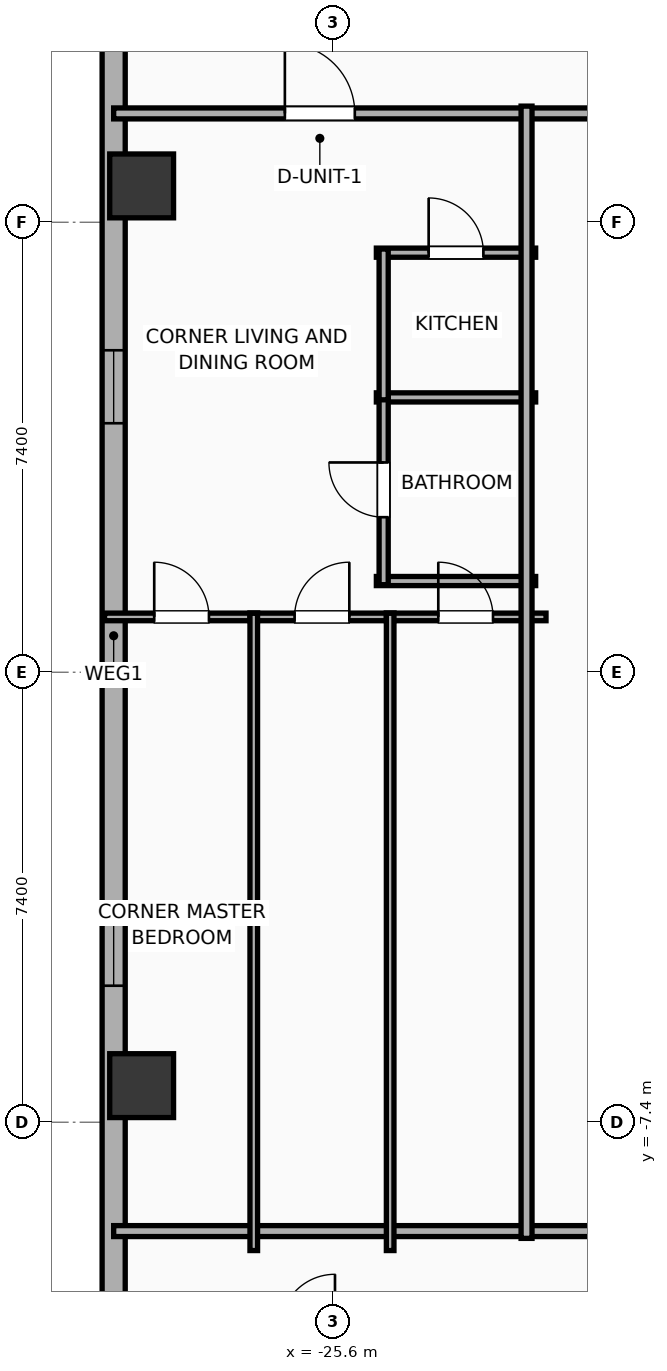
"""IFC4 building model, lengths in metres.
Left out: names, types, materials, properties, quantities, classifications, styles, units other than length and angle.
Written with IfcOpenShell. Run it as: python <this file> out.ifc"""

import sys

from ifc_helpers import new_model, si_unit, direction, frame, frame_2d, origin, origin_2d, place, context, subcontext, project, spatial, rectangle, hollow_rectangle, extrude, element, fill, save


model = new_model("IFC4")
c1 = context("Model", 3, precision=1e-05, world=origin(), true_north=direction((0.0, 1.0)))
c2 = subcontext(c1, "Body", "Model", "MODEL_VIEW")
j1 = project(units=[si_unit("LENGTHUNIT", "METRE"), si_unit("PLANEANGLEUNIT", "RADIAN")], contexts=[c1])
p1 = place(None, origin())
s1 = spatial("IfcSite", under=j1, at=p1, CompositionType="ELEMENT")
p2 = place(p1, origin())
s2 = spatial("IfcBuilding", under=s1, at=p2, CompositionType="ELEMENT")
p3 = place(p2, frame((0.0, 0.0, 132.6)))
s3 = spatial("IfcBuildingStorey", under=s2, at=p3, CompositionType="ELEMENT", Elevation=132.6)
for number, where, z_axis, x_axis in (
    (1, (-28.75, 7.998, 0.0), (0.0, 0.0, 1.0), (1.0, 0.0, 0.0)),
    (2, (-28.75, -6.798, 0.0), (0.0, 0.0, 1.0), (1.0, 0.0, 0.0)),
):
    element("IfcColumn", number, at=place(p3, frame(where, z_axis=z_axis, x_axis=x_axis)), inside=s3, PredefinedType="COLUMN", context=c2, shape_type="SweptSolid", body=[
        extrude(hollow_rectangle(XDim=1.05, YDim=1.05, WallThickness=0.036, at=origin_2d()), origin(), (0.0, 0.0, 1.0), 3.9),
    ])
p4 = place(p3, frame((-29.21, -16.581, 0.0), z_axis=(0.0, 0.0, 1.0), x_axis=(0.0, 1.0, 0.0)))
e3 = element("IfcWall", 3, at=p4, inside=s3, PredefinedType="ELEMENTEDWALL", context=c2, shape_type="SweptSolid", body=[
    extrude(rectangle(XDim=34.363, YDim=0.38, at=frame_2d((17.181, 0.0))), origin(), (0.0, 0.0, 1.0), 3.65),
])
p5 = place(p4, frame((31.437, 0.0, 0.75)))
e4 = element("IfcOpeningElement", 4, at=p5, cuts=e3, PredefinedType="OPENING", context=c2, shape_type="SweptSolid", body=[
    extrude(rectangle(XDim=1.2, YDim=2.05, at=frame_2d((0.6, 1.025))), frame((0.0, 0.2, 0.0), z_axis=(0.0, -1.0, 0.0), x_axis=(1.0, 0.0, 0.0)), (0.0, 0.0, 1.0), 0.4),
])
p6 = place(p4, frame((20.676, 0.0, 0.75)))
e5 = element("IfcOpeningElement", 5, at=p6, cuts=e3, PredefinedType="OPENING", context=c2, shape_type="SweptSolid", body=[
    extrude(rectangle(XDim=1.2, YDim=2.05, at=frame_2d((0.6, 1.025))), frame((0.0, 0.2, 0.0), z_axis=(0.0, -1.0, 0.0), x_axis=(1.0, 0.0, 0.0)), (0.0, 0.0, 1.0), 0.4),
])
p7 = place(p4, frame((11.426, 0.0, 0.75)))
e6 = element("IfcOpeningElement", 6, at=p7, cuts=e3, PredefinedType="OPENING", context=c2, shape_type="SweptSolid", body=[
    extrude(rectangle(XDim=1.2, YDim=2.05, at=frame_2d((0.6, 1.025))), frame((0.0, 0.2, 0.0), z_axis=(0.0, -1.0, 0.0), x_axis=(1.0, 0.0, 0.0)), (0.0, 0.0, 1.0), 0.4),
])
p8 = place(p3, frame((-29.21, 9.19, 0.0), z_axis=(0.0, 0.0, 1.0), x_axis=(1.0, 0.0, 0.0)))
e7 = element("IfcWall", 7, at=p8, inside=s3, PredefinedType="PARTITIONING", context=c2, shape_type="SweptSolid", body=[
    extrude(rectangle(XDim=19.33, YDim=0.18, at=frame_2d((9.665, 0.0))), origin(), (0.0, 0.0, 1.0), 3.65),
])
p9 = place(p8, frame((2.815, 0.0, 0.0)))
e8 = element("IfcOpeningElement", 8, at=p9, cuts=e7, PredefinedType="OPENING", context=c2, shape_type="SweptSolid", body=[
    extrude(rectangle(XDim=1.15, YDim=2.05, at=frame_2d((0.575, 1.025))), frame((0.0, 0.1, 0.0), z_axis=(0.0, -1.0, 0.0), x_axis=(1.0, 0.0, 0.0)), (0.0, 0.0, 1.0), 0.2),
])
p10 = place(p3, frame((-29.21, -9.19, 0.0), z_axis=(0.0, 0.0, 1.0), x_axis=(1.0, 0.0, 0.0)))
e9 = element("IfcWall", 9, at=p10, inside=s3, PredefinedType="PARTITIONING", context=c2, shape_type="SweptSolid", body=[
    extrude(rectangle(XDim=19.33, YDim=0.18, at=frame_2d((9.665, 0.0))), origin(), (0.0, 0.0, 1.0), 3.65),
])
p11 = place(p3, frame((-24.89, 6.9, 0.0), z_axis=(0.0, 0.0, 1.0), x_axis=(1.0, 0.0, 0.0)))
e10 = element("IfcWall", 10, at=p11, inside=s3, PredefinedType="PLUMBINGWALL", context=c2, shape_type="SweptSolid", body=[
    extrude(rectangle(XDim=2.62, YDim=0.15, at=frame_2d((1.31, 0.0))), origin(), (0.0, 0.0, 1.0), 3.65),
])
p12 = place(p11, frame((0.86, 0.0, 0.0)))
e11 = element("IfcOpeningElement", 11, at=p12, cuts=e10, PredefinedType="OPENING", context=c2, shape_type="SweptSolid", body=[
    extrude(rectangle(XDim=0.9, YDim=2.05, at=frame_2d((0.45, 1.025))), frame((0.0, 0.085, 0.0), z_axis=(0.0, -1.0, 0.0), x_axis=(1.0, 0.0, 0.0)), (0.0, 0.0, 1.0), 0.17),
])
for number, where, z_axis, x_axis in (
    (12, (-24.89, 4.52, 0.0), (0.0, 0.0, 1.0), (1.0, 0.0, 0.0)),
    (13, (-24.89, 1.5, 0.0), (0.0, 0.0, 1.0), (1.0, 0.0, 0.0)),
):
    element("IfcWall", number, at=place(p3, frame(where, z_axis=z_axis, x_axis=x_axis)), inside=s3, PredefinedType="PLUMBINGWALL", context=c2, shape_type="SweptSolid", body=[
        extrude(rectangle(XDim=2.62, YDim=0.15, at=frame_2d((1.31, 0.0))), origin(), (0.0, 0.0, 1.0), 3.65),
    ])
p13 = place(p3, frame((-24.77, 1.44, 0.0), z_axis=(0.0, 0.0, 1.0), x_axis=(0.0, 1.0, 0.0)))
e14 = element("IfcWall", 14, at=p13, inside=s3, PredefinedType="PLUMBINGWALL", context=c2, shape_type="SweptSolid", body=[
    extrude(rectangle(XDim=3.12, YDim=0.15, at=frame_2d((1.56, 0.0))), origin(), (0.0, 0.0, 1.0), 3.65),
])
p14 = place(p13, frame((1.11, 0.0, 0.0)))
e15 = element("IfcOpeningElement", 15, at=p14, cuts=e14, PredefinedType="OPENING", context=c2, shape_type="SweptSolid", body=[
    extrude(rectangle(XDim=0.9, YDim=2.05, at=frame_2d((0.45, 1.025))), frame((0.0, 0.085, 0.0), z_axis=(0.0, -1.0, 0.0), x_axis=(1.0, 0.0, 0.0)), (0.0, 0.0, 1.0), 0.17),
])
p15 = place(p3, frame((-24.77, 4.48, 0.0), z_axis=(0.0, 0.0, 1.0), x_axis=(0.0, 1.0, 0.0)))
e16 = element("IfcWall", 16, at=p15, inside=s3, PredefinedType="PLUMBINGWALL", context=c2, shape_type="SweptSolid", body=[
    extrude(rectangle(XDim=2.48, YDim=0.15, at=frame_2d((1.24, 0.0))), origin(), (0.0, 0.0, 1.0), 3.65),
])
p16 = place(p3, frame((-29.36, 0.91, 0.0), z_axis=(0.0, 0.0, 1.0), x_axis=(1.0, 0.0, 0.0)))
e17 = element("IfcWall", 17, at=p16, inside=s3, PredefinedType="PARTITIONING", context=c2, shape_type="SweptSolid", body=[
    extrude(rectangle(XDim=2.517, YDim=0.125, at=frame_2d((1.258, 0.0))), origin(), (0.0, 0.0, 1.0), 3.65),
])
p17 = place(p16, frame((0.817, 0.0, 0.0)))
e18 = element("IfcOpeningElement", 18, at=p17, cuts=e17, PredefinedType="OPENING", context=c2, shape_type="SweptSolid", body=[
    extrude(rectangle(XDim=0.9, YDim=2.05, at=frame_2d((0.45, 1.025))), frame((0.0, 0.073, 0.0), z_axis=(0.0, -1.0, 0.0), x_axis=(1.0, 0.0, 0.0)), (0.0, 0.0, 1.0), 0.145),
])
p18 = place(p3, frame((-26.969, 0.91, 0.0), z_axis=(0.0, 0.0, 1.0), x_axis=(1.0, 0.0, 0.0)))
e19 = element("IfcWall", 19, at=p18, inside=s3, PredefinedType="PARTITIONING", context=c2, shape_type="SweptSolid", body=[
    extrude(rectangle(XDim=2.368, YDim=0.125, at=frame_2d((1.184, 0.0))), origin(), (0.0, 0.0, 1.0), 3.65),
])
p19 = place(p18, frame((0.734, 0.0, 0.0)))
e20 = element("IfcOpeningElement", 20, at=p19, cuts=e19, PredefinedType="OPENING", context=c2, shape_type="SweptSolid", body=[
    extrude(rectangle(XDim=0.9, YDim=2.05, at=frame_2d((0.45, 1.025))), frame((0.0, 0.073, 0.0), z_axis=(0.0, -1.0, 0.0), x_axis=(1.0, 0.0, 0.0)), (0.0, 0.0, 1.0), 0.145),
])
p20 = place(p3, frame((-24.726, 0.91, 0.0), z_axis=(0.0, 0.0, 1.0), x_axis=(1.0, 0.0, 0.0)))
e21 = element("IfcWall", 21, at=p20, inside=s3, PredefinedType="PARTITIONING", context=c2, shape_type="SweptSolid", body=[
    extrude(rectangle(XDim=2.625, YDim=0.125, at=frame_2d((1.313, 0.0))), origin(), (0.0, 0.0, 1.0), 3.65),
])
p21 = place(p20, frame((0.854, 0.0, 0.0)))
e22 = element("IfcOpeningElement", 22, at=p21, cuts=e21, PredefinedType="OPENING", context=c2, shape_type="SweptSolid", body=[
    extrude(rectangle(XDim=0.9, YDim=2.05, at=frame_2d((0.45, 1.025))), frame((0.0, 0.073, 0.0), z_axis=(0.0, -1.0, 0.0), x_axis=(1.0, 0.0, 0.0)), (0.0, 0.0, 1.0), 0.145),
])
for number, where, z_axis, x_axis in (
    (23, (-24.663, -9.51, 0.0), (0.0, 0.0, 1.0), (0.0, 1.0, 0.0)),
    (24, (-26.906, -9.51, 0.0), (0.0, 0.0, 1.0), (0.0, 1.0, 0.0)),
):
    element("IfcWall", number, at=place(p3, frame(where, z_axis=z_axis, x_axis=x_axis)), inside=s3, PredefinedType="PARTITIONING", context=c2, shape_type="SweptSolid", body=[
        extrude(rectangle(XDim=10.48, YDim=0.125, at=frame_2d((5.24, 0.0))), origin(), (0.0, 0.0, 1.0), 3.65),
    ])
p22 = place(p3, frame((-22.42, -9.31, 0.0), z_axis=(0.0, 0.0, 1.0), x_axis=(0.0, 1.0, 0.0)))
e25 = element("IfcWall", 25, at=p22, inside=s3, PredefinedType="PARTITIONING", context=c2, shape_type="SweptSolid", body=[
    extrude(rectangle(XDim=18.62, YDim=0.18, at=frame_2d((9.31, 0.0))), origin(), (0.0, 0.0, 1.0), 3.65),
])
p23 = place(p6, origin())
e26 = element("IfcWindow", 26, at=p23, inside=s3, PartitioningType="SINGLE_PANEL", PredefinedType="WINDOW", context=c2, shape_type="SweptSolid", body=[
    extrude(rectangle(XDim=1.2, YDim=2.05, at=frame_2d((0.6, 1.025))), frame((0.0, 0.03, 0.0), z_axis=(0.0, -1.0, 0.0), x_axis=(1.0, 0.0, 0.0)), (0.0, 0.0, 1.0), 0.06),
])
fill(e5, e26)
p24 = place(p7, origin())
e27 = element("IfcWindow", 27, at=p24, inside=s3, PartitioningType="SINGLE_PANEL", PredefinedType="WINDOW", context=c2, shape_type="SweptSolid", body=[
    extrude(rectangle(XDim=1.2, YDim=2.05, at=frame_2d((0.6, 1.025))), frame((0.0, 0.03, 0.0), z_axis=(0.0, -1.0, 0.0), x_axis=(1.0, 0.0, 0.0)), (0.0, 0.0, 1.0), 0.06),
])
fill(e6, e27)
p25 = place(p9, origin())
e28 = element("IfcDoor", 28, at=p25, inside=s3, OperationType="SINGLE_SWING_LEFT", PredefinedType="DOOR", context=c2, shape_type="SweptSolid", body=[
    extrude(rectangle(XDim=1.15, YDim=2.05, at=frame_2d((0.575, 1.025))), frame((0.0, 0.025, 0.0), z_axis=(0.0, -1.0, 0.0), x_axis=(1.0, 0.0, 0.0)), (0.0, 0.0, 1.0), 0.05),
])
fill(e8, e28)
p26 = place(p12, origin())
e29 = element("IfcDoor", 29, at=p26, inside=s3, OperationType="SINGLE_SWING_LEFT", PredefinedType="DOOR", context=c2, shape_type="SweptSolid", body=[
    extrude(rectangle(XDim=0.9, YDim=2.05, at=frame_2d((0.45, 1.025))), frame((0.0, 0.025, 0.0), z_axis=(0.0, -1.0, 0.0), x_axis=(1.0, 0.0, 0.0)), (0.0, 0.0, 1.0), 0.05),
])
fill(e11, e29)
p27 = place(p14, origin())
e30 = element("IfcDoor", 30, at=p27, inside=s3, OperationType="SINGLE_SWING_RIGHT", PredefinedType="DOOR", context=c2, shape_type="SweptSolid", body=[
    extrude(rectangle(XDim=0.9, YDim=2.05, at=frame_2d((0.45, 1.025))), frame((0.0, 0.025, 0.0), z_axis=(0.0, -1.0, 0.0), x_axis=(1.0, 0.0, 0.0)), (0.0, 0.0, 1.0), 0.05),
])
fill(e15, e30)
p28 = place(p17, origin())
e31 = element("IfcDoor", 31, at=p28, inside=s3, OperationType="SINGLE_SWING_LEFT", PredefinedType="DOOR", context=c2, shape_type="SweptSolid", body=[
    extrude(rectangle(XDim=0.9, YDim=2.05, at=frame_2d((0.45, 1.025))), frame((0.0, 0.025, 0.0), z_axis=(0.0, -1.0, 0.0), x_axis=(1.0, 0.0, 0.0)), (0.0, 0.0, 1.0), 0.05),
])
fill(e18, e31)
p29 = place(p19, origin())
e32 = element("IfcDoor", 32, at=p29, inside=s3, OperationType="SINGLE_SWING_RIGHT", PredefinedType="DOOR", context=c2, shape_type="SweptSolid", body=[
    extrude(rectangle(XDim=0.9, YDim=2.05, at=frame_2d((0.45, 1.025))), frame((0.0, 0.025, 0.0), z_axis=(0.0, -1.0, 0.0), x_axis=(1.0, 0.0, 0.0)), (0.0, 0.0, 1.0), 0.05),
])
fill(e20, e32)
p30 = place(p21, origin())
e33 = element("IfcDoor", 33, at=p30, inside=s3, OperationType="SINGLE_SWING_LEFT", PredefinedType="DOOR", context=c2, shape_type="SweptSolid", body=[
    extrude(rectangle(XDim=0.9, YDim=2.05, at=frame_2d((0.45, 1.025))), frame((0.0, 0.025, 0.0), z_axis=(0.0, -1.0, 0.0), x_axis=(1.0, 0.0, 0.0)), (0.0, 0.0, 1.0), 0.05),
])
fill(e22, e33)
save(model, sys.argv[1])
